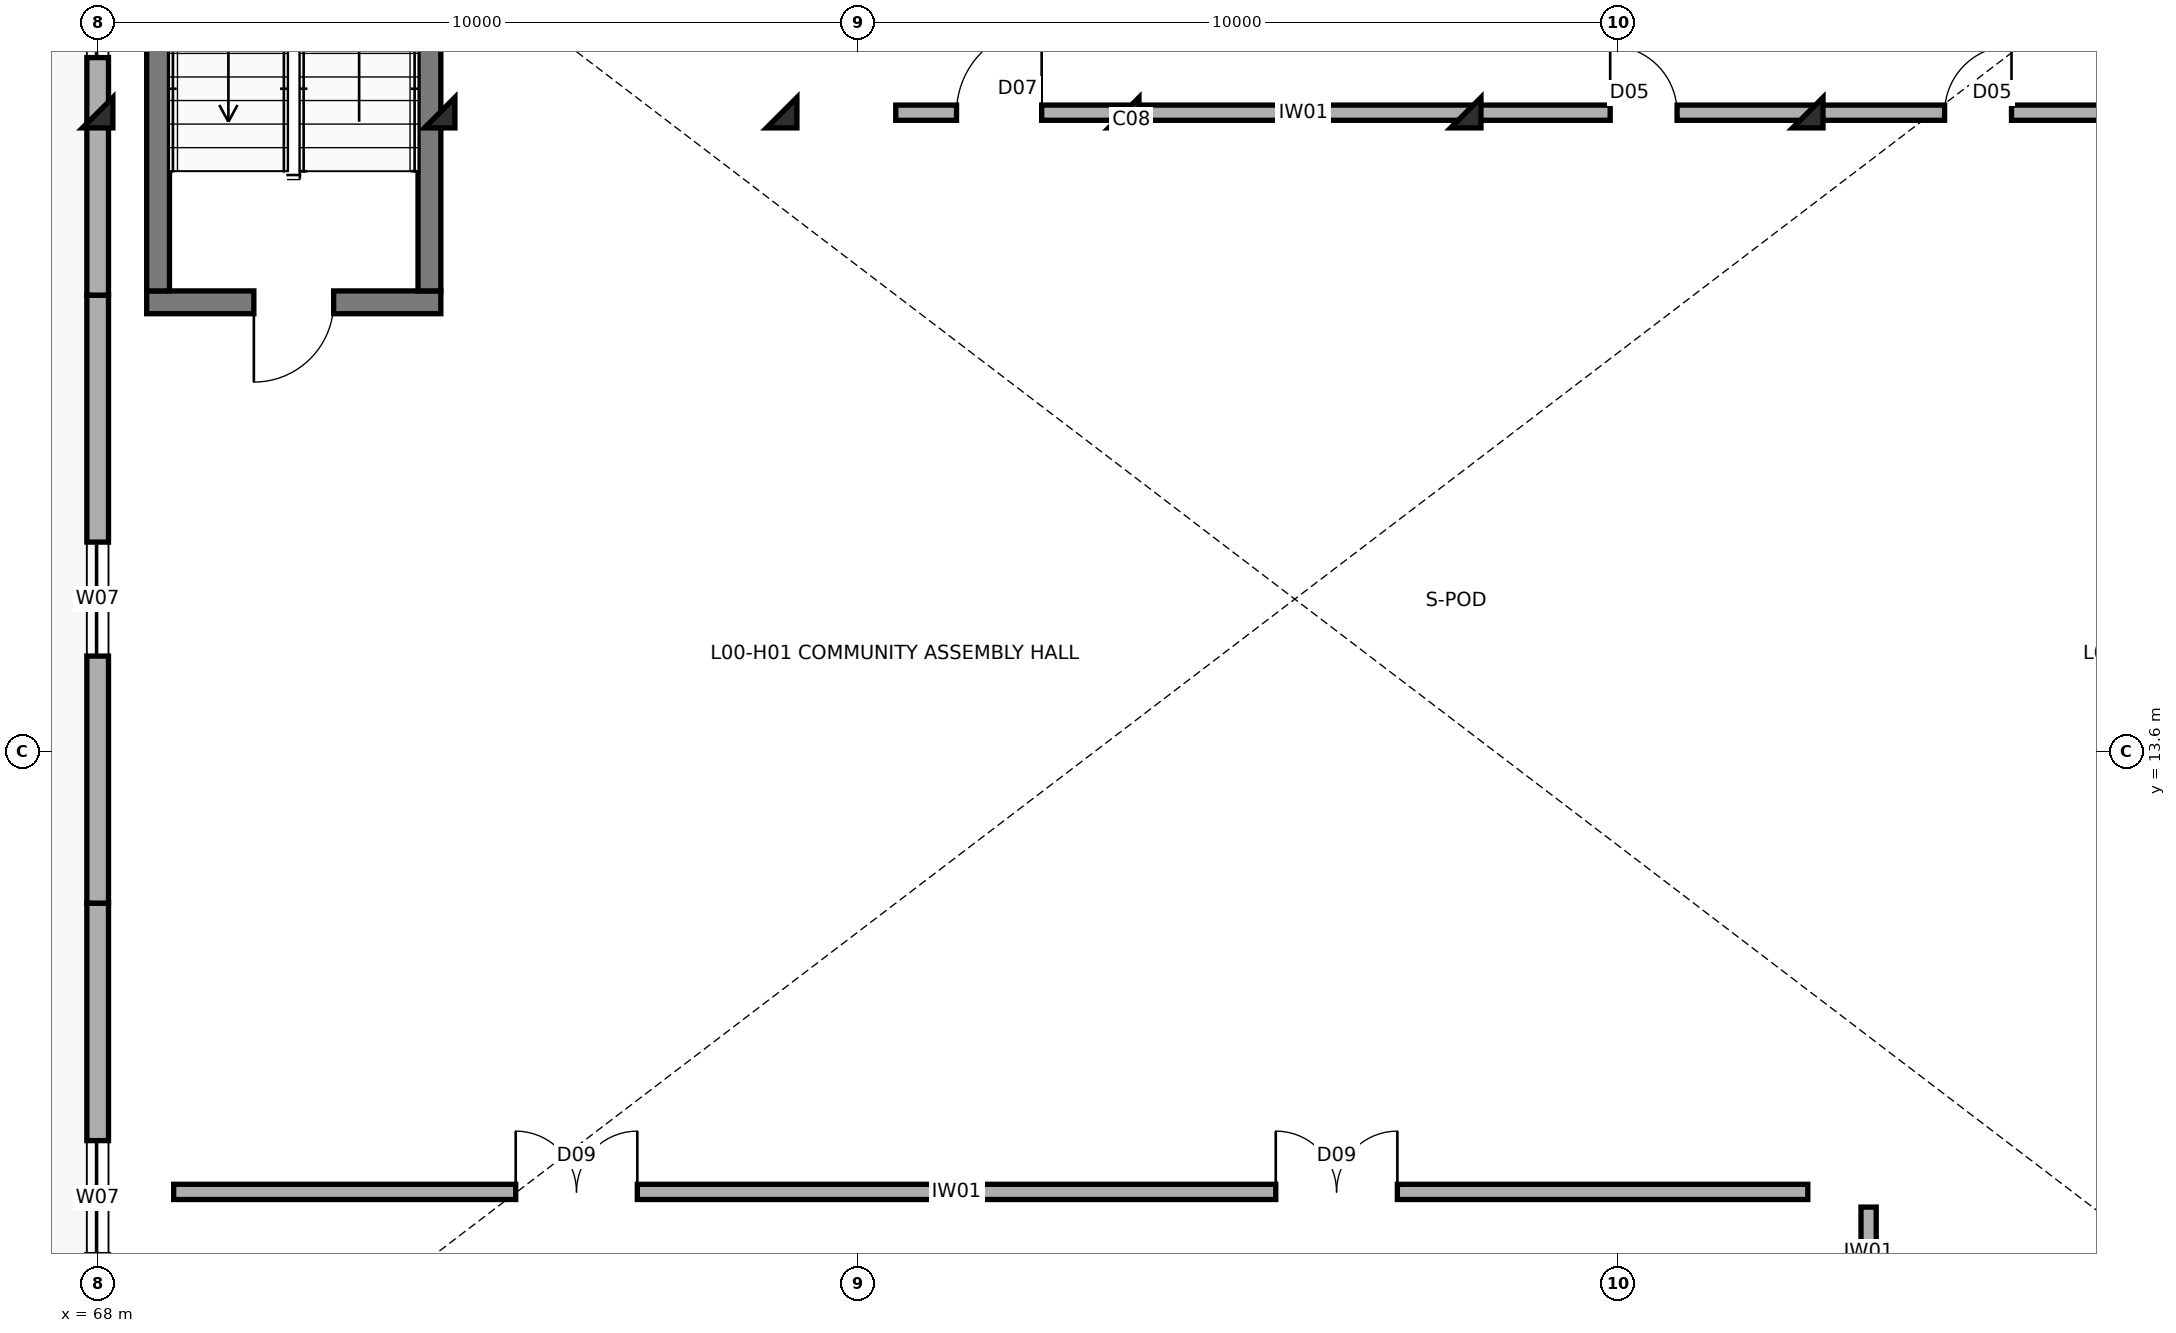
"""IFC4 building model, lengths in metres.
Left out: names, types, materials, properties, quantities, classifications, styles, units other than length and angle.
Written with IfcOpenShell. Run it as: python <this file> out.ifc"""

import sys

from ifc_helpers import new_model, si_unit, direction, frame, frame_2d, origin, origin_2d, place, context, subcontext, project, spatial, rectangle, extrude, element, fill, save


model = new_model("IFC4")
c1 = context("Model", 3, precision=1e-05, world=origin(), true_north=direction((0.0, 1.0)))
c2 = subcontext(c1, "Body", "Model", "MODEL_VIEW")
j1 = project(units=[si_unit("LENGTHUNIT", "METRE"), si_unit("PLANEANGLEUNIT", "RADIAN")], contexts=[c1])
p1 = place(None, origin())
s1 = spatial("IfcSite", under=j1, at=p1, CompositionType="ELEMENT")
p2 = place(p1, origin())
s2 = spatial("IfcBuilding", under=s1, at=p2, CompositionType="ELEMENT")
p3 = place(p2, origin())
s3 = spatial("IfcBuildingStorey", under=s2, at=p3, CompositionType="ELEMENT", Elevation=0.0)
for number, where, z_axis, x_axis in (
    (1, (68.0, 22.0, 0.0), (0.0, 0.0, 1.0), (1.0, 0.0, 0.0)),
    (2, (72.5, 22.0, 0.0), (0.0, 0.0, 1.0), (1.0, 0.0, 0.0)),
    (3, (77.0, 22.0, 0.0), (0.0, 0.0, 1.0), (1.0, 0.0, 0.0)),
    (4, (81.5, 22.0, 0.0), (0.0, 0.0, 1.0), (1.0, 0.0, 0.0)),
    (5, (86.0, 22.0, 0.0), (0.0, 0.0, 1.0), (1.0, 0.0, 0.0)),
    (6, (90.5, 22.0, 0.0), (0.0, 0.0, 1.0), (1.0, 0.0, 0.0)),
):
    element("IfcColumn", number, at=place(p3, frame(where, z_axis=z_axis, x_axis=x_axis)), inside=s3, PredefinedType="COLUMN", context=c2, shape_type="SweptSolid", body=[
        extrude(rectangle(XDim=0.4, YDim=0.4, at=origin_2d()), origin(), (0.0, 0.0, 1.0), 4.5),
    ])
p4 = place(p3, frame((68.0, 3.85, 0.0), z_axis=(0.0, 0.0, 1.0), x_axis=(0.0, 1.0, 0.0)))
e7 = element("IfcWall", 7, at=p4, inside=s3, PredefinedType="SOLIDWALL", context=c2, shape_type="SweptSolid", body=[
    extrude(rectangle(XDim=7.75, YDim=0.285, at=frame_2d((3.875, 0.0))), origin(), (0.0, 0.0, 1.0), 3.5),
])
p5 = place(p4, frame((3.125, 0.0, 0.45)))
e8 = element("IfcOpeningElement", 8, at=p5, cuts=e7, PredefinedType="OPENING", context=c2, shape_type="SweptSolid", body=[
    extrude(rectangle(XDim=1.5, YDim=1.65, at=frame_2d((0.75, 0.825))), frame((0.0, 0.152, 0.0), z_axis=(0.0, -1.0, 0.0), x_axis=(1.0, 0.0, 0.0)), (0.0, 0.0, 1.0), 0.305),
])
p6 = place(p3, frame((68.0, 11.6, 0.0), z_axis=(0.0, 0.0, 1.0), x_axis=(0.0, 1.0, 0.0)))
e9 = element("IfcWall", 9, at=p6, inside=s3, PredefinedType="SOLIDWALL", context=c2, shape_type="SweptSolid", body=[
    extrude(rectangle(XDim=8.0, YDim=0.285, at=frame_2d((4.0, 0.0))), origin(), (0.0, 0.0, 1.0), 3.5),
])
p7 = place(p6, frame((3.25, 0.0, 0.45)))
e10 = element("IfcOpeningElement", 10, at=p7, cuts=e9, PredefinedType="OPENING", context=c2, shape_type="SweptSolid", body=[
    extrude(rectangle(XDim=1.5, YDim=1.65, at=frame_2d((0.75, 0.825))), frame((0.0, 0.152, 0.0), z_axis=(0.0, -1.0, 0.0), x_axis=(1.0, 0.0, 0.0)), (0.0, 0.0, 1.0), 0.305),
])
p8 = place(p3, frame((68.0, 19.6, 0.0), z_axis=(0.0, 0.0, 1.0), x_axis=(0.0, 1.0, 0.0)))
e11 = element("IfcWall", 11, at=p8, inside=s3, PredefinedType="SOLIDWALL", context=c2, shape_type="SweptSolid", body=[
    extrude(rectangle(XDim=7.75, YDim=0.285, at=frame_2d((3.875, 0.0))), origin(), (0.0, 0.0, 1.0), 3.5),
])
p9 = place(p8, frame((3.125, 0.0, 0.45)))
e12 = element("IfcOpeningElement", 12, at=p9, cuts=e11, PredefinedType="OPENING", context=c2, shape_type="SweptSolid", body=[
    extrude(rectangle(XDim=1.5, YDim=1.65, at=frame_2d((0.75, 0.825))), frame((0.0, 0.152, 0.0), z_axis=(0.0, -1.0, 0.0), x_axis=(1.0, 0.0, 0.0)), (0.0, 0.0, 1.0), 0.305),
])
p10 = place(p3, frame((72.515, 19.505, 0.0), z_axis=(0.0, 0.0, 1.0), x_axis=(-1.0, 0.0, 0.0)))
e13 = element("IfcWall", 13, at=p10, inside=s3, PredefinedType="SHEAR", context=c2, shape_type="SweptSolid", body=[
    extrude(rectangle(XDim=3.87, YDim=0.3, at=frame_2d((1.935, 0.0))), origin(), (0.0, 0.0, 1.0), 4.5),
])
p11 = place(p10, frame((1.41, 0.0, 0.0)))
e14 = element("IfcOpeningElement", 14, at=p11, cuts=e13, PredefinedType="OPENING", context=c2, shape_type="SweptSolid", body=[
    extrude(rectangle(XDim=1.05, YDim=2.15, at=frame_2d((0.525, 1.075))), frame((0.0, 0.16, 0.0), z_axis=(0.0, -1.0, 0.0), x_axis=(1.0, 0.0, 0.0)), (0.0, 0.0, 1.0), 0.32),
])
for number, where, z_axis, x_axis in (
    (15, (72.365, 19.655, 0.0), (0.0, 0.0, 1.0), (0.0, 1.0, 0.0)),
    (16, (68.795, 19.655, 0.0), (0.0, 0.0, 1.0), (0.0, 1.0, 0.0)),
):
    element("IfcWall", number, at=place(p3, frame(where, z_axis=z_axis, x_axis=x_axis)), inside=s3, PredefinedType="SHEAR", context=c2, shape_type="SweptSolid", body=[
        extrude(rectangle(XDim=7.69, YDim=0.3, at=frame_2d((3.845, 0.0))), origin(), (0.0, 0.0, 1.0), 4.5),
    ])
p12 = place(p3, frame((69.0, 7.8, 0.0), z_axis=(0.0, 0.0, 1.0), x_axis=(1.0, 0.0, 0.0)))
e17 = element("IfcWall", 17, at=p12, inside=s3, PredefinedType="SOLIDWALL", context=c2, shape_type="SweptSolid", body=[
    extrude(rectangle(XDim=21.5, YDim=0.2, at=frame_2d((10.75, 0.0))), origin(), (0.0, 0.0, 1.0), 3.4),
])
p13 = place(p12, frame((4.5, 0.0, 0.0)))
e18 = element("IfcOpeningElement", 18, at=p13, cuts=e17, PredefinedType="OPENING", context=c2, shape_type="SweptSolid", body=[
    extrude(rectangle(XDim=1.6, YDim=2.25, at=frame_2d((0.8, 1.125))), frame((0.0, 0.11, 0.0), z_axis=(0.0, -1.0, 0.0), x_axis=(1.0, 0.0, 0.0)), (0.0, 0.0, 1.0), 0.22),
])
p14 = place(p12, frame((14.5, 0.0, 0.0)))
e19 = element("IfcOpeningElement", 19, at=p14, cuts=e17, PredefinedType="OPENING", context=c2, shape_type="SweptSolid", body=[
    extrude(rectangle(XDim=1.6, YDim=2.25, at=frame_2d((0.8, 1.125))), frame((0.0, 0.11, 0.0), z_axis=(0.0, -1.0, 0.0), x_axis=(1.0, 0.0, 0.0)), (0.0, 0.0, 1.0), 0.22),
])
p15 = place(p3, frame((91.3, 4.2, 0.0), z_axis=(0.0, 0.0, 1.0), x_axis=(0.0, 1.0, 0.0)))
e20 = element("IfcWall", 20, at=p15, inside=s3, PredefinedType="SOLIDWALL", context=c2, shape_type="SweptSolid", body=[
    extrude(rectangle(XDim=3.4, YDim=0.2, at=frame_2d((1.7, 0.0))), origin(), (0.0, 0.0, 1.0), 3.4),
])
p16 = place(p15, frame((1.1, 0.0, 0.0)))
e21 = element("IfcOpeningElement", 21, at=p16, cuts=e20, PredefinedType="OPENING", context=c2, shape_type="SweptSolid", body=[
    extrude(rectangle(XDim=1.12, YDim=2.15, at=frame_2d((0.56, 1.075))), frame((0.0, 0.11, 0.0), z_axis=(0.0, -1.0, 0.0), x_axis=(1.0, 0.0, 0.0)), (0.0, 0.0, 1.0), 0.22),
])
p17 = place(p3, frame((78.5, 22.0, 0.0), z_axis=(0.0, 0.0, 1.0), x_axis=(1.0, 0.0, 0.0)))
e22 = element("IfcWall", 22, at=p17, inside=s3, PredefinedType="SOLIDWALL", context=c2, shape_type="SweptSolid", body=[
    extrude(rectangle(XDim=20.3, YDim=0.2, at=frame_2d((10.15, 0.0))), origin(), (0.0, 0.0, 1.0), 3.4),
])
p18 = place(p17, frame((0.8, 0.0, 0.0)))
e23 = element("IfcOpeningElement", 23, at=p18, cuts=e22, PredefinedType="OPENING", context=c2, shape_type="SweptSolid", body=[
    extrude(rectangle(XDim=1.12, YDim=2.15, at=frame_2d((0.56, 1.075))), frame((0.0, 0.11, 0.0), z_axis=(0.0, -1.0, 0.0), x_axis=(1.0, 0.0, 0.0)), (0.0, 0.0, 1.0), 0.22),
])
p19 = place(p17, frame((9.4, 0.0, 0.0)))
e24 = element("IfcOpeningElement", 24, at=p19, cuts=e22, PredefinedType="OPENING", context=c2, shape_type="SweptSolid", body=[
    extrude(rectangle(XDim=0.88, YDim=2.1, at=frame_2d((0.44, 1.05))), frame((0.0, 0.11, 0.0), z_axis=(0.0, -1.0, 0.0), x_axis=(1.0, 0.0, 0.0)), (0.0, 0.0, 1.0), 0.22),
])
p20 = place(p17, frame((13.8, 0.0, 0.0)))
e25 = element("IfcOpeningElement", 25, at=p20, cuts=e22, PredefinedType="OPENING", context=c2, shape_type="SweptSolid", body=[
    extrude(rectangle(XDim=0.88, YDim=2.1, at=frame_2d((0.44, 1.05))), frame((0.0, 0.11, 0.0), z_axis=(0.0, -1.0, 0.0), x_axis=(1.0, 0.0, 0.0)), (0.0, 0.0, 1.0), 0.22),
])
p21 = place(p17, frame((17.8, 0.0, 0.0)))
e26 = element("IfcOpeningElement", 26, at=p21, cuts=e22, PredefinedType="OPENING", context=c2, shape_type="SweptSolid", body=[
    extrude(rectangle(XDim=0.95, YDim=2.1, at=frame_2d((0.475, 1.05))), frame((0.0, 0.11, 0.0), z_axis=(0.0, -1.0, 0.0), x_axis=(1.0, 0.0, 0.0)), (0.0, 0.0, 1.0), 0.22),
])
p22 = place(p5, origin())
e27 = element("IfcWindow", 27, at=p22, inside=s3, PartitioningType="DOUBLE_PANEL_VERTICAL", PredefinedType="WINDOW", context=c2, shape_type="SweptSolid", body=[
    extrude(rectangle(XDim=1.5, YDim=1.65, at=frame_2d((0.75, 0.825))), frame((0.0, 0.03, 0.0), z_axis=(0.0, -1.0, 0.0), x_axis=(1.0, 0.0, 0.0)), (0.0, 0.0, 1.0), 0.06),
])
fill(e8, e27)
p23 = place(p7, origin())
e28 = element("IfcWindow", 28, at=p23, inside=s3, PartitioningType="DOUBLE_PANEL_VERTICAL", PredefinedType="WINDOW", context=c2, shape_type="SweptSolid", body=[
    extrude(rectangle(XDim=1.5, YDim=1.65, at=frame_2d((0.75, 0.825))), frame((0.0, 0.03, 0.0), z_axis=(0.0, -1.0, 0.0), x_axis=(1.0, 0.0, 0.0)), (0.0, 0.0, 1.0), 0.06),
])
fill(e10, e28)
p24 = place(p9, origin())
e29 = element("IfcWindow", 29, at=p24, inside=s3, PartitioningType="DOUBLE_PANEL_VERTICAL", PredefinedType="WINDOW", context=c2, shape_type="SweptSolid", body=[
    extrude(rectangle(XDim=1.5, YDim=1.65, at=frame_2d((0.75, 0.825))), frame((0.0, 0.03, 0.0), z_axis=(0.0, -1.0, 0.0), x_axis=(1.0, 0.0, 0.0)), (0.0, 0.0, 1.0), 0.06),
])
fill(e12, e29)
p25 = place(p11, origin())
e30 = element("IfcDoor", 30, at=p25, inside=s3, OperationType="SINGLE_SWING_RIGHT", PredefinedType="DOOR", context=c2, shape_type="SweptSolid", body=[
    extrude(rectangle(XDim=1.05, YDim=2.15, at=frame_2d((0.525, 1.075))), frame((0.0, 0.025, 0.0), z_axis=(0.0, -1.0, 0.0), x_axis=(1.0, 0.0, 0.0)), (0.0, 0.0, 1.0), 0.05),
])
fill(e14, e30)
p26 = place(p13, origin())
e31 = element("IfcDoor", 31, at=p26, inside=s3, OperationType="DOUBLE_DOOR_SINGLE_SWING", PredefinedType="DOOR", context=c2, shape_type="SweptSolid", body=[
    extrude(rectangle(XDim=1.6, YDim=2.25, at=frame_2d((0.8, 1.125))), frame((0.0, 0.025, 0.0), z_axis=(0.0, -1.0, 0.0), x_axis=(1.0, 0.0, 0.0)), (0.0, 0.0, 1.0), 0.05),
])
fill(e18, e31)
p27 = place(p14, origin())
e32 = element("IfcDoor", 32, at=p27, inside=s3, OperationType="DOUBLE_DOOR_SINGLE_SWING", PredefinedType="DOOR", context=c2, shape_type="SweptSolid", body=[
    extrude(rectangle(XDim=1.6, YDim=2.25, at=frame_2d((0.8, 1.125))), frame((0.0, 0.025, 0.0), z_axis=(0.0, -1.0, 0.0), x_axis=(1.0, 0.0, 0.0)), (0.0, 0.0, 1.0), 0.05),
])
fill(e19, e32)
p28 = place(p18, origin())
e33 = element("IfcDoor", 33, at=p28, inside=s3, OperationType="SINGLE_SWING_RIGHT", PredefinedType="DOOR", context=c2, shape_type="SweptSolid", body=[
    extrude(rectangle(XDim=1.12, YDim=2.15, at=frame_2d((0.56, 1.075))), frame((0.0, 0.025, 0.0), z_axis=(0.0, -1.0, 0.0), x_axis=(1.0, 0.0, 0.0)), (0.0, 0.0, 1.0), 0.05),
])
fill(e23, e33)
p29 = place(p19, origin())
e34 = element("IfcDoor", 34, at=p29, inside=s3, OperationType="SINGLE_SWING_LEFT", PredefinedType="DOOR", context=c2, shape_type="SweptSolid", body=[
    extrude(rectangle(XDim=0.88, YDim=2.1, at=frame_2d((0.44, 1.05))), frame((0.0, 0.025, 0.0), z_axis=(0.0, -1.0, 0.0), x_axis=(1.0, 0.0, 0.0)), (0.0, 0.0, 1.0), 0.05),
])
fill(e24, e34)
p30 = place(p20, origin())
e35 = element("IfcDoor", 35, at=p30, inside=s3, OperationType="SINGLE_SWING_RIGHT", PredefinedType="DOOR", context=c2, shape_type="SweptSolid", body=[
    extrude(rectangle(XDim=0.88, YDim=2.1, at=frame_2d((0.44, 1.05))), frame((0.0, 0.025, 0.0), z_axis=(0.0, -1.0, 0.0), x_axis=(1.0, 0.0, 0.0)), (0.0, 0.0, 1.0), 0.05),
])
fill(e25, e35)
save(model, sys.argv[1])
